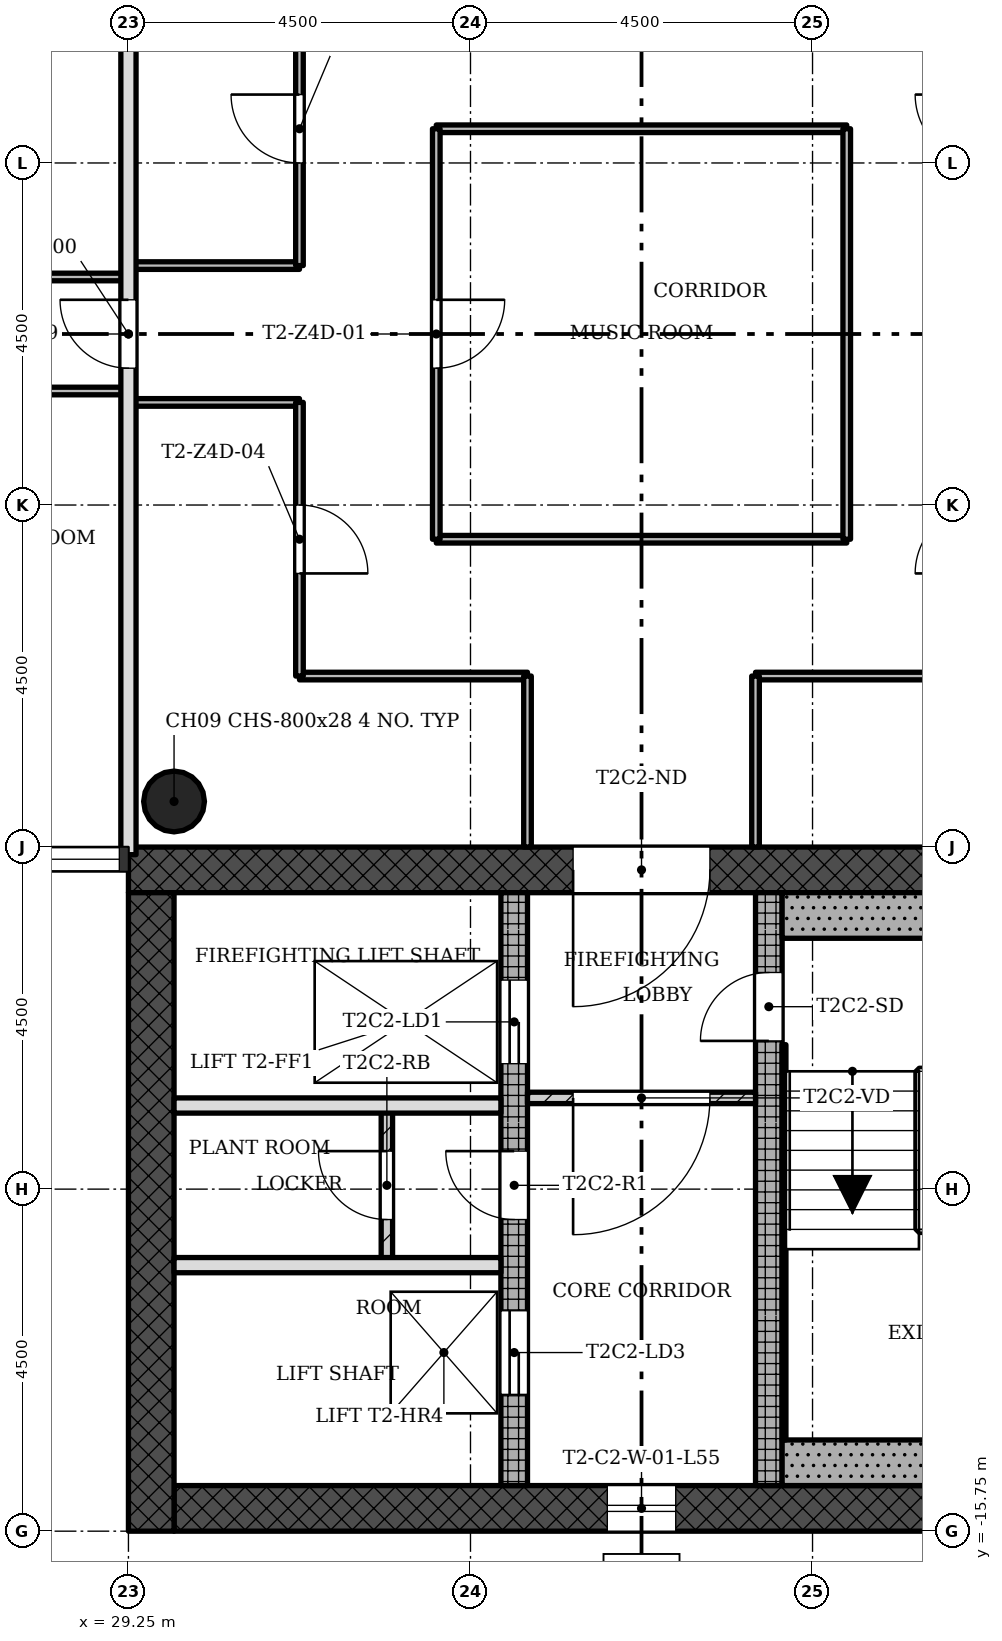
"""IFC4 building model, lengths in metres.
Left out: names, types, materials, properties, quantities, classifications, styles, units other than length and angle.
Written with IfcOpenShell. Run it as: python <this file> out.ifc"""

import sys

from ifc_helpers import new_model, si_unit, direction, frame, frame_2d, origin, origin_2d, place, context, subcontext, project, spatial, rectangle, hollow_circle, extrude, element, fill, save


model = new_model("IFC4")
c1 = context("Model", 3, precision=1e-05, world=origin(), true_north=direction((0.0, 1.0)))
c2 = subcontext(c1, "Body", "Model", "MODEL_VIEW")
j1 = project(units=[si_unit("LENGTHUNIT", "METRE"), si_unit("PLANEANGLEUNIT", "RADIAN")], contexts=[c1])
p1 = place(None, origin())
s1 = spatial("IfcSite", under=j1, at=p1, CompositionType="ELEMENT")
p2 = place(p1, origin())
s2 = spatial("IfcBuilding", under=s1, at=p2, CompositionType="ELEMENT")
p3 = place(p2, frame((0.0, 0.0, 199.4)))
s3 = spatial("IfcBuildingStorey", under=s2, at=p3, CompositionType="ELEMENT", Elevation=199.4)
p4 = place(p3, frame((29.85, -15.45, 0.0), z_axis=(0.0, 0.0, 1.0), x_axis=(1.0, 0.0, 0.0)))
e1 = element("IfcWall", 1, at=p4, inside=s3, PredefinedType="SHEAR", context=c2, shape_type="SweptSolid", body=[
    extrude(rectangle(XDim=12.9, YDim=0.6, at=frame_2d((6.45, 0.0))), origin(), (0.0, 0.0, 1.0), 3.4),
])
p5 = place(p4, frame((5.7, 0.0, 0.45)))
e2 = element("IfcOpeningElement", 2, at=p5, cuts=e1, PredefinedType="OPENING", context=c2, shape_type="SweptSolid", body=[
    extrude(rectangle(XDim=0.9, YDim=2.4, at=frame_2d((0.45, 1.2))), frame((0.0, 0.31, 0.0), z_axis=(0.0, -1.0, 0.0), x_axis=(1.0, 0.0, 0.0)), (0.0, 0.0, 1.0), 0.62),
])
p6 = place(p3, frame((42.15, -7.05, 0.0), z_axis=(0.0, 0.0, 1.0), x_axis=(-1.0, 0.0, 0.0)))
e3 = element("IfcWall", 3, at=p6, inside=s3, PredefinedType="SHEAR", context=c2, shape_type="SweptSolid", body=[
    extrude(rectangle(XDim=12.9, YDim=0.6, at=frame_2d((6.45, 0.0))), origin(), (0.0, 0.0, 1.0), 3.4),
])
p7 = place(p6, frame((5.25, 0.0, 0.0)))
e4 = element("IfcOpeningElement", 4, at=p7, cuts=e3, PredefinedType="OPENING", context=c2, shape_type="SweptSolid", body=[
    extrude(rectangle(XDim=1.8, YDim=2.1, at=frame_2d((0.9, 1.05))), frame((0.0, 0.31, 0.0), z_axis=(0.0, -1.0, 0.0), x_axis=(1.0, 0.0, 0.0)), (0.0, 0.0, 1.0), 0.62),
])
p8 = place(p3, frame((29.55, -7.35, 0.0), z_axis=(0.0, 0.0, 1.0), x_axis=(0.0, -1.0, 0.0)))
e5 = element("IfcWall", 5, at=p8, inside=s3, PredefinedType="SHEAR", context=c2, shape_type="SweptSolid", body=[
    extrude(rectangle(XDim=8.4, YDim=0.6, at=frame_2d((4.2, 0.0))), origin(), (0.0, 0.0, 1.0), 3.4),
])
p9 = place(p3, frame((34.325, -15.15, 0.0), z_axis=(0.0, 0.0, 1.0), x_axis=(0.0, 1.0, 0.0)))
e6 = element("IfcWall", 6, at=p9, inside=s3, PredefinedType="SHEAR", context=c2, shape_type="SweptSolid", body=[
    extrude(rectangle(XDim=7.8, YDim=0.35, at=frame_2d((3.9, 0.0))), origin(), (0.0, 0.0, 1.0), 3.4),
])
p10 = place(p9, frame((5.55, 0.0, 0.0)))
e7 = element("IfcOpeningElement", 7, at=p10, cuts=e6, PredefinedType="OPENING", context=c2, shape_type="SweptSolid", body=[
    extrude(rectangle(XDim=1.1, YDim=2.1, at=frame_2d((0.55, 1.05))), frame((0.0, 0.185, 0.0), z_axis=(0.0, -1.0, 0.0), x_axis=(1.0, 0.0, 0.0)), (0.0, 0.0, 1.0), 0.37),
])
p11 = place(p9, frame((1.2, 0.0, 0.0)))
e8 = element("IfcOpeningElement", 8, at=p11, cuts=e6, PredefinedType="OPENING", context=c2, shape_type="SweptSolid", body=[
    extrude(rectangle(XDim=1.1, YDim=2.1, at=frame_2d((0.55, 1.05))), frame((0.0, 0.185, 0.0), z_axis=(0.0, -1.0, 0.0), x_axis=(1.0, 0.0, 0.0)), (0.0, 0.0, 1.0), 0.37),
])
p12 = place(p9, frame((3.5, 0.0, 0.0)))
e9 = element("IfcOpeningElement", 9, at=p12, cuts=e6, PredefinedType="OPENING", context=c2, shape_type="SweptSolid", body=[
    extrude(rectangle(XDim=0.9, YDim=2.1, at=frame_2d((0.45, 1.05))), frame((0.0, 0.185, 0.0), z_axis=(0.0, -1.0, 0.0), x_axis=(1.0, 0.0, 0.0)), (0.0, 0.0, 1.0), 0.37),
])
p13 = place(p3, frame((37.675, -15.15, 0.0), z_axis=(0.0, 0.0, 1.0), x_axis=(0.0, 1.0, 0.0)))
e10 = element("IfcWall", 10, at=p13, inside=s3, PredefinedType="SHEAR", context=c2, shape_type="SweptSolid", body=[
    extrude(rectangle(XDim=7.8, YDim=0.35, at=frame_2d((3.9, 0.0))), origin(), (0.0, 0.0, 1.0), 3.4),
])
p14 = place(p13, frame((5.85, 0.0, 0.0)))
e11 = element("IfcOpeningElement", 11, at=p14, cuts=e10, PredefinedType="OPENING", context=c2, shape_type="SweptSolid", body=[
    extrude(rectangle(XDim=0.9, YDim=2.1, at=frame_2d((0.45, 1.05))), frame((0.0, 0.185, 0.0), z_axis=(0.0, -1.0, 0.0), x_axis=(1.0, 0.0, 0.0)), (0.0, 0.0, 1.0), 0.37),
])
p15 = place(p3, frame((29.85, -6.15, 0.0), z_axis=(0.0, 0.0, 1.0), x_axis=(1.0, 0.0, 0.0)))
e12 = element("IfcColumn", 12, at=p15, inside=s3, PredefinedType="COLUMN", context=c2, shape_type="SweptSolid", body=[
    extrude(hollow_circle(Radius=0.4, WallThickness=0.028, at=origin_2d()), origin(), (0.0, 0.0, 1.0), 3.4),
])
p16 = place(p3, frame((34.5, -10.05, 0.0), z_axis=(0.0, 0.0, 1.0), x_axis=(1.0, 0.0, 0.0)))
e13 = element("IfcWall", 13, at=p16, inside=s3, PredefinedType="PARTITIONING", context=c2, shape_type="SweptSolid", body=[
    extrude(rectangle(XDim=3.0, YDim=0.15, at=frame_2d((1.5, 0.0))), origin(), (0.0, 0.0, 1.0), 3.0),
])
p17 = place(p16, frame((0.6, 0.0, 0.0)))
e14 = element("IfcOpeningElement", 14, at=p17, cuts=e13, PredefinedType="OPENING", context=c2, shape_type="SweptSolid", body=[
    extrude(rectangle(XDim=1.8, YDim=2.1, at=frame_2d((0.9, 1.05))), frame((0.0, 0.085, 0.0), z_axis=(0.0, -1.0, 0.0), x_axis=(1.0, 0.0, 0.0)), (0.0, 0.0, 1.0), 0.17),
])
for number, where, z_axis, x_axis in (
    (15, (29.85, -12.25, 0.0), (0.0, 0.0, 1.0), (1.0, 0.0, 0.0)),
    (16, (29.85, -10.15, 0.0), (0.0, 0.0, 1.0), (1.0, 0.0, 0.0)),
):
    element("IfcWall", number, at=place(p3, frame(where, z_axis=z_axis, x_axis=x_axis)), inside=s3, PredefinedType="SOLIDWALL", context=c2, shape_type="SweptSolid", body=[
        extrude(rectangle(XDim=4.3, YDim=0.2, at=frame_2d((2.15, 0.0))), origin(), (0.0, 0.0, 1.0), 3.0),
    ])
p18 = place(p3, frame((32.65, -10.15, 0.0), z_axis=(0.0, 0.0, 1.0), x_axis=(0.0, -1.0, 0.0)))
e17 = element("IfcWall", 17, at=p18, inside=s3, PredefinedType="PARTITIONING", context=c2, shape_type="SweptSolid", body=[
    extrude(rectangle(XDim=2.1, YDim=0.15, at=frame_2d((1.05, 0.0))), origin(), (0.0, 0.0, 1.0), 3.0),
])
p19 = place(p18, frame((0.6, 0.0, 0.0)))
e18 = element("IfcOpeningElement", 18, at=p19, cuts=e17, PredefinedType="OPENING", context=c2, shape_type="SweptSolid", body=[
    extrude(rectangle(XDim=0.9, YDim=2.1, at=frame_2d((0.45, 1.05))), frame((0.0, 0.085, 0.0), z_axis=(0.0, -1.0, 0.0), x_axis=(1.0, 0.0, 0.0)), (0.0, 0.0, 1.0), 0.17),
])
for number, where, z_axis, x_axis in (
    (19, (40.5, -4.5, 0.0), (0.0, 0.0, 1.0), (-1.0, 0.0, 0.0)),
    (20, (34.5, -4.5, 0.0), (0.0, 0.0, 1.0), (-1.0, 0.0, 0.0)),
):
    element("IfcWall", number, at=place(p3, frame(where, z_axis=z_axis, x_axis=x_axis)), inside=s3, PredefinedType="PARTITIONING", context=c2, shape_type="SweptSolid", body=[
        extrude(rectangle(XDim=3.0, YDim=0.1, at=frame_2d((1.5, 0.0))), origin(), (0.0, 0.0, 1.0), 3.0),
    ])
p20 = place(p3, frame((38.7, -2.7, 0.0), z_axis=(0.0, 0.0, 1.0), x_axis=(-1.0, 0.0, 0.0)))
e21 = element("IfcWall", 21, at=p20, inside=s3, PredefinedType="PARTITIONING", context=c2, shape_type="SweptSolid", body=[
    extrude(rectangle(XDim=5.4, YDim=0.1, at=frame_2d((2.7, 0.0))), origin(), (0.0, 0.0, 1.0), 3.0),
])
p21 = place(p3, frame((31.5, -0.9, 0.0), z_axis=(0.0, 0.0, 1.0), x_axis=(-1.0, 0.0, 0.0)))
e22 = element("IfcWall", 22, at=p21, inside=s3, PredefinedType="PARTITIONING", context=c2, shape_type="SweptSolid", body=[
    extrude(rectangle(XDim=2.25, YDim=0.1, at=frame_2d((1.125, 0.0))), origin(), (0.0, 0.0, 1.0), 3.0),
])
p22 = place(p3, frame((29.25, -0.75, 0.0), z_axis=(0.0, 0.0, 1.0), x_axis=(-1.0, 0.0, 0.0)))
e23 = element("IfcWall", 23, at=p22, inside=s3, PredefinedType="PARTITIONING", context=c2, shape_type="SweptSolid", body=[
    extrude(rectangle(XDim=4.5, YDim=0.1, at=frame_2d((2.25, 0.0))), origin(), (0.0, 0.0, 1.0), 3.0),
])
p23 = place(p22, frame((1.8, 0.0, 0.0)))
e24 = element("IfcOpeningElement", 24, at=p23, cuts=e23, PredefinedType="OPENING", context=c2, shape_type="SweptSolid", body=[
    extrude(rectangle(XDim=0.9, YDim=2.1, at=frame_2d((0.45, 1.05))), frame((0.0, 0.06, 0.0), z_axis=(0.0, -1.0, 0.0), x_axis=(1.0, 0.0, 0.0)), (0.0, 0.0, 1.0), 0.12),
])
p24 = place(p3, frame((29.25, 0.75, 0.0), z_axis=(0.0, 0.0, 1.0), x_axis=(-1.0, 0.0, 0.0)))
e25 = element("IfcWall", 25, at=p24, inside=s3, PredefinedType="PARTITIONING", context=c2, shape_type="SweptSolid", body=[
    extrude(rectangle(XDim=7.8, YDim=0.1, at=frame_2d((3.9, 0.0))), origin(), (0.0, 0.0, 1.0), 3.0),
])
p25 = place(p24, frame((1.8, 0.0, 0.0)))
e26 = element("IfcOpeningElement", 26, at=p25, cuts=e25, PredefinedType="OPENING", context=c2, shape_type="SweptSolid", body=[
    extrude(rectangle(XDim=0.9, YDim=2.1, at=frame_2d((0.45, 1.05))), frame((0.0, 0.06, 0.0), z_axis=(0.0, -1.0, 0.0), x_axis=(1.0, 0.0, 0.0)), (0.0, 0.0, 1.0), 0.12),
])
p26 = place(p24, frame((4.95, 0.0, 0.0)))
e27 = element("IfcOpeningElement", 27, at=p26, cuts=e25, PredefinedType="OPENING", context=c2, shape_type="SweptSolid", body=[
    extrude(rectangle(XDim=0.9, YDim=2.1, at=frame_2d((0.45, 1.05))), frame((0.0, 0.06, 0.0), z_axis=(0.0, -1.0, 0.0), x_axis=(1.0, 0.0, 0.0)), (0.0, 0.0, 1.0), 0.12),
])
p27 = place(p24, frame((6.6, 0.0, 0.0)))
e28 = element("IfcOpeningElement", 28, at=p27, cuts=e25, PredefinedType="OPENING", context=c2, shape_type="SweptSolid", body=[
    extrude(rectangle(XDim=0.9, YDim=2.1, at=frame_2d((0.45, 1.05))), frame((0.0, 0.06, 0.0), z_axis=(0.0, -1.0, 0.0), x_axis=(1.0, 0.0, 0.0)), (0.0, 0.0, 1.0), 0.12),
])
p28 = place(p3, frame((31.5, 0.9, 0.0), z_axis=(0.0, 0.0, 1.0), x_axis=(-1.0, 0.0, 0.0)))
e29 = element("IfcWall", 29, at=p28, inside=s3, PredefinedType="PARTITIONING", context=c2, shape_type="SweptSolid", body=[
    extrude(rectangle(XDim=2.25, YDim=0.1, at=frame_2d((1.125, 0.0))), origin(), (0.0, 0.0, 1.0), 3.0),
])
for number, where, z_axis, x_axis in (
    (30, (38.7, 2.7, 0.0), (0.0, 0.0, 1.0), (-1.0, 0.0, 0.0)),
    (31, (38.7, -2.7, 0.0), (0.0, 0.0, 1.0), (0.0, 1.0, 0.0)),
):
    element("IfcWall", number, at=place(p3, frame(where, z_axis=z_axis, x_axis=x_axis)), inside=s3, PredefinedType="PARTITIONING", context=c2, shape_type="SweptSolid", body=[
        extrude(rectangle(XDim=5.4, YDim=0.1, at=frame_2d((2.7, 0.0))), origin(), (0.0, 0.0, 1.0), 3.0),
    ])
for number, where, z_axis, x_axis in (
    (32, (37.5, -6.75, 0.0), (0.0, 0.0, 1.0), (0.0, 1.0, 0.0)),
    (33, (34.5, -6.75, 0.0), (0.0, 0.0, 1.0), (0.0, 1.0, 0.0)),
):
    element("IfcWall", number, at=place(p3, frame(where, z_axis=z_axis, x_axis=x_axis)), inside=s3, PredefinedType="PARTITIONING", context=c2, shape_type="SweptSolid", body=[
        extrude(rectangle(XDim=2.25, YDim=0.1, at=frame_2d((1.125, 0.0))), origin(), (0.0, 0.0, 1.0), 3.0),
    ])
p29 = place(p3, frame((33.3, -2.7, 0.0), z_axis=(0.0, 0.0, 1.0), x_axis=(0.0, 1.0, 0.0)))
e34 = element("IfcWall", 34, at=p29, inside=s3, PredefinedType="PARTITIONING", context=c2, shape_type="SweptSolid", body=[
    extrude(rectangle(XDim=5.4, YDim=0.1, at=frame_2d((2.7, 0.0))), origin(), (0.0, 0.0, 1.0), 3.0),
])
p30 = place(p29, frame((2.25, 0.0, 0.0)))
e35 = element("IfcOpeningElement", 35, at=p30, cuts=e34, PredefinedType="OPENING", context=c2, shape_type="SweptSolid", body=[
    extrude(rectangle(XDim=0.9, YDim=2.1, at=frame_2d((0.45, 1.05))), frame((0.0, 0.06, 0.0), z_axis=(0.0, -1.0, 0.0), x_axis=(1.0, 0.0, 0.0)), (0.0, 0.0, 1.0), 0.12),
])
p31 = place(p3, frame((31.5, -4.5, 0.0), z_axis=(0.0, 0.0, 1.0), x_axis=(0.0, 1.0, 0.0)))
e36 = element("IfcWall", 36, at=p31, inside=s3, PredefinedType="PARTITIONING", context=c2, shape_type="SweptSolid", body=[
    extrude(rectangle(XDim=3.6, YDim=0.1, at=frame_2d((1.8, 0.0))), origin(), (0.0, 0.0, 1.0), 3.0),
])
p32 = place(p31, frame((1.35, 0.0, 0.0)))
e37 = element("IfcOpeningElement", 37, at=p32, cuts=e36, PredefinedType="OPENING", context=c2, shape_type="SweptSolid", body=[
    extrude(rectangle(XDim=0.9, YDim=2.1, at=frame_2d((0.45, 1.05))), frame((0.0, 0.06, 0.0), z_axis=(0.0, -1.0, 0.0), x_axis=(1.0, 0.0, 0.0)), (0.0, 0.0, 1.0), 0.12),
])
p33 = place(p3, frame((31.5, 0.9, 0.0), z_axis=(0.0, 0.0, 1.0), x_axis=(0.0, 1.0, 0.0)))
e38 = element("IfcWall", 38, at=p33, inside=s3, PredefinedType="PARTITIONING", context=c2, shape_type="SweptSolid", body=[
    extrude(rectangle(XDim=3.6, YDim=0.1, at=frame_2d((1.8, 0.0))), origin(), (0.0, 0.0, 1.0), 3.0),
])
p34 = place(p33, frame((1.35, 0.0, 0.0)))
e39 = element("IfcOpeningElement", 39, at=p34, cuts=e38, PredefinedType="OPENING", context=c2, shape_type="SweptSolid", body=[
    extrude(rectangle(XDim=0.9, YDim=2.1, at=frame_2d((0.45, 1.05))), frame((0.0, 0.06, 0.0), z_axis=(0.0, -1.0, 0.0), x_axis=(1.0, 0.0, 0.0)), (0.0, 0.0, 1.0), 0.12),
])
p35 = place(p3, frame((29.25, -6.85, 0.0), z_axis=(0.0, 0.0, 1.0), x_axis=(0.0, 1.0, 0.0)))
e40 = element("IfcWall", 40, at=p35, inside=s3, PredefinedType="SOLIDWALL", context=c2, shape_type="SweptSolid", body=[
    extrude(rectangle(XDim=13.7, YDim=0.2, at=frame_2d((6.85, 0.0))), origin(), (0.0, 0.0, 1.0), 3.0),
])
p36 = place(p35, frame((6.4, 0.0, 0.0)))
e41 = element("IfcOpeningElement", 41, at=p36, cuts=e40, PredefinedType="OPENING", context=c2, shape_type="SweptSolid", body=[
    extrude(rectangle(XDim=0.9, YDim=2.1, at=frame_2d((0.45, 1.05))), frame((0.0, 0.11, 0.0), z_axis=(0.0, -1.0, 0.0), x_axis=(1.0, 0.0, 0.0)), (0.0, 0.0, 1.0), 0.22),
])
for number, where, z_axis, x_axis in (
    (42, (37.85, -14.85, 0.0), (0.0, 0.0, 1.0), (1.0, 0.0, 0.0)),
    (43, (37.85, -7.65, 0.0), (0.0, 0.0, 1.0), (1.0, 0.0, 0.0)),
):
    element("IfcWall", number, at=place(p3, frame(where, z_axis=z_axis, x_axis=x_axis)), inside=s3, PredefinedType="SHEAR", context=c2, shape_type="SweptSolid", body=[
        extrude(rectangle(XDim=4.3, YDim=0.6, at=frame_2d((2.15, 0.0))), origin(), (0.0, 0.0, 1.0), 3.4),
    ])
p37 = place(p3, frame((37.875, -9.35, 0.0), z_axis=(0.0, 0.0, 1.0), x_axis=(0.0, -1.0, 0.0)))
e44 = element("IfcWall", 44, at=p37, inside=s3, PredefinedType="SHEAR", context=c2, shape_type="SweptSolid", body=[
    extrude(rectangle(XDim=5.2, YDim=0.05, at=frame_2d((2.6, 0.0))), origin(), (0.0, 0.0, 1.0), 3.4),
])
p38 = place(p5, origin())
e45 = element("IfcWindow", 45, at=p38, inside=s3, PartitioningType="SINGLE_PANEL", PredefinedType="WINDOW", context=c2, shape_type="SweptSolid", body=[
    extrude(rectangle(XDim=0.9, YDim=2.4, at=frame_2d((0.45, 1.2))), frame((0.0, 0.03, 0.0), z_axis=(0.0, -1.0, 0.0), x_axis=(1.0, 0.0, 0.0)), (0.0, 0.0, 1.0), 0.06),
])
fill(e2, e45)
p39 = place(p17, origin())
e46 = element("IfcDoor", 46, at=p39, inside=s3, OperationType="SINGLE_SWING_LEFT", PredefinedType="DOOR", context=c2, shape_type="SweptSolid", body=[
    extrude(rectangle(XDim=1.8, YDim=2.1, at=frame_2d((0.9, 1.05))), frame((0.0, 0.025, 0.0), z_axis=(0.0, -1.0, 0.0), x_axis=(1.0, 0.0, 0.0)), (0.0, 0.0, 1.0), 0.05),
])
fill(e14, e46)
p40 = place(p19, origin())
e47 = element("IfcDoor", 47, at=p40, inside=s3, OperationType="SINGLE_SWING_LEFT", PredefinedType="DOOR", context=c2, shape_type="SweptSolid", body=[
    extrude(rectangle(XDim=0.9, YDim=2.1, at=frame_2d((0.45, 1.05))), frame((0.0, 0.025, 0.0), z_axis=(0.0, -1.0, 0.0), x_axis=(1.0, 0.0, 0.0)), (0.0, 0.0, 1.0), 0.05),
])
fill(e18, e47)
p41 = place(p30, origin())
e48 = element("IfcDoor", 48, at=p41, inside=s3, OperationType="SINGLE_SWING_RIGHT", PredefinedType="DOOR", context=c2, shape_type="SweptSolid", body=[
    extrude(rectangle(XDim=0.9, YDim=2.1, at=frame_2d((0.45, 1.05))), frame((0.0, 0.025, 0.0), z_axis=(0.0, -1.0, 0.0), x_axis=(1.0, 0.0, 0.0)), (0.0, 0.0, 1.0), 0.05),
])
fill(e35, e48)
p42 = place(p34, origin())
e49 = element("IfcDoor", 49, at=p42, inside=s3, OperationType="SINGLE_SWING_LEFT", PredefinedType="DOOR", context=c2, shape_type="SweptSolid", body=[
    extrude(rectangle(XDim=0.9, YDim=2.1, at=frame_2d((0.45, 1.05))), frame((0.0, 0.025, 0.0), z_axis=(0.0, -1.0, 0.0), x_axis=(1.0, 0.0, 0.0)), (0.0, 0.0, 1.0), 0.05),
])
fill(e39, e49)
p43 = place(p32, origin())
e50 = element("IfcDoor", 50, at=p43, inside=s3, OperationType="SINGLE_SWING_LEFT", PredefinedType="DOOR", context=c2, shape_type="SweptSolid", body=[
    extrude(rectangle(XDim=0.9, YDim=2.1, at=frame_2d((0.45, 1.05))), frame((0.0, 0.025, 0.0), z_axis=(0.0, -1.0, 0.0), x_axis=(1.0, 0.0, 0.0)), (0.0, 0.0, 1.0), 0.05),
])
fill(e37, e50)
p44 = place(p36, origin())
e51 = element("IfcDoor", 51, at=p44, inside=s3, OperationType="SINGLE_SWING_LEFT", PredefinedType="DOOR", context=c2, shape_type="SweptSolid", body=[
    extrude(rectangle(XDim=0.9, YDim=2.1, at=frame_2d((0.45, 1.05))), frame((0.0, 0.025, 0.0), z_axis=(0.0, -1.0, 0.0), x_axis=(1.0, 0.0, 0.0)), (0.0, 0.0, 1.0), 0.05),
])
fill(e41, e51)
p45 = place(p14, origin())
e52 = element("IfcDoor", 52, at=p45, inside=s3, OperationType="SINGLE_SWING_RIGHT", PredefinedType="DOOR", context=c2, shape_type="SweptSolid", body=[
    extrude(rectangle(XDim=0.9, YDim=2.1, at=frame_2d((0.45, 1.05))), frame((0.0, 0.025, 0.0), z_axis=(0.0, -1.0, 0.0), x_axis=(1.0, 0.0, 0.0)), (0.0, 0.0, 1.0), 0.05),
])
fill(e11, e52)
p46 = place(p10, origin())
e53 = element("IfcDoor", 53, at=p46, inside=s3, OperationType="SLIDING_TO_LEFT", PredefinedType="DOOR", context=c2, shape_type="SweptSolid", body=[
    extrude(rectangle(XDim=1.1, YDim=2.1, at=frame_2d((0.55, 1.05))), frame((0.0, 0.025, 0.0), z_axis=(0.0, -1.0, 0.0), x_axis=(1.0, 0.0, 0.0)), (0.0, 0.0, 1.0), 0.05),
])
fill(e7, e53)
p47 = place(p11, origin())
e54 = element("IfcDoor", 54, at=p47, inside=s3, OperationType="SLIDING_TO_LEFT", PredefinedType="DOOR", context=c2, shape_type="SweptSolid", body=[
    extrude(rectangle(XDim=1.1, YDim=2.1, at=frame_2d((0.55, 1.05))), frame((0.0, 0.025, 0.0), z_axis=(0.0, -1.0, 0.0), x_axis=(1.0, 0.0, 0.0)), (0.0, 0.0, 1.0), 0.05),
])
fill(e8, e54)
p48 = place(p12, origin())
e55 = element("IfcDoor", 55, at=p48, inside=s3, OperationType="SINGLE_SWING_LEFT", PredefinedType="DOOR", context=c2, shape_type="SweptSolid", body=[
    extrude(rectangle(XDim=0.9, YDim=2.1, at=frame_2d((0.45, 1.05))), frame((0.0, 0.025, 0.0), z_axis=(0.0, -1.0, 0.0), x_axis=(1.0, 0.0, 0.0)), (0.0, 0.0, 1.0), 0.05),
])
fill(e9, e55)
p49 = place(p7, origin())
e56 = element("IfcDoor", 56, at=p49, inside=s3, OperationType="SINGLE_SWING_LEFT", PredefinedType="DOOR", context=c2, shape_type="SweptSolid", body=[
    extrude(rectangle(XDim=1.8, YDim=2.1, at=frame_2d((0.9, 1.05))), frame((0.0, 0.025, 0.0), z_axis=(0.0, -1.0, 0.0), x_axis=(1.0, 0.0, 0.0)), (0.0, 0.0, 1.0), 0.05),
])
fill(e4, e56)
save(model, sys.argv[1])
